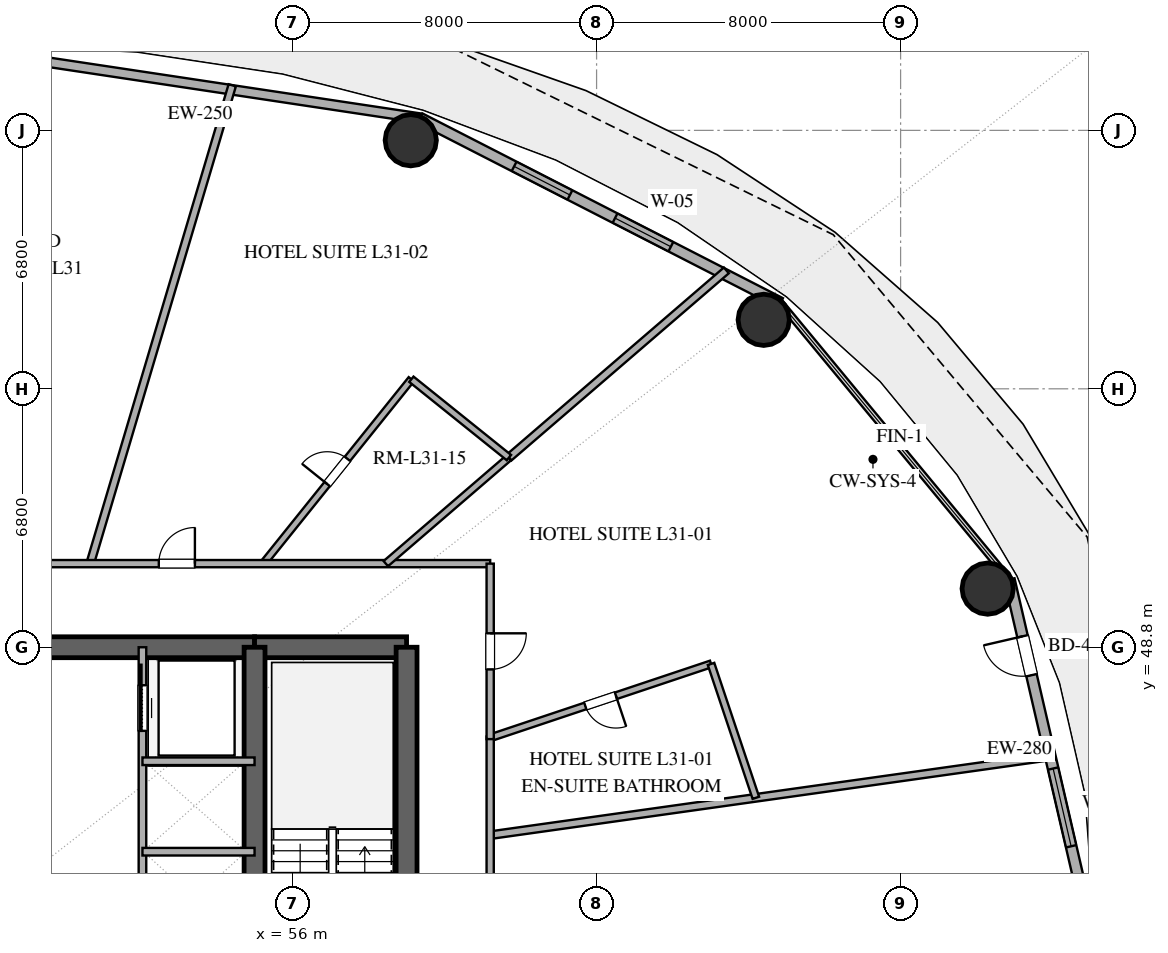
"""IFC4 building model, lengths in metres.
Left out: names, types, materials, properties, quantities, classifications, styles, units other than length and angle.
Written with IfcOpenShell. Run it as: python <this file> out.ifc"""

import sys

from ifc_helpers import new_model, si_unit, direction, frame, frame_2d, origin, origin_2d, place, context, subcontext, project, spatial, rectangle, hollow_circle, extrude, element, fill, save


model = new_model("IFC4")
c1 = context("Model", 3, precision=1e-05, world=origin(), true_north=direction((0.0, 1.0)))
c2 = subcontext(c1, "Body", "Model", "MODEL_VIEW")
j1 = project(units=[si_unit("LENGTHUNIT", "METRE"), si_unit("PLANEANGLEUNIT", "RADIAN")], contexts=[c1])
p1 = place(None, origin())
s1 = spatial("IfcSite", under=j1, at=p1, CompositionType="ELEMENT")
p2 = place(p1, origin())
s2 = spatial("IfcBuilding", under=s1, at=p2, CompositionType="ELEMENT")
p3 = place(p2, frame((0.0, 0.0, 123.6)))
s3 = spatial("IfcBuildingStorey", under=s2, at=p3, CompositionType="ELEMENT", Elevation=123.6)
p4 = place(p3, frame((41.0, 48.8, 0.0), z_axis=(0.0, 0.0, 1.0), x_axis=(1.0, 0.0, 0.0)))
e1 = element("IfcWall", 1, at=p4, inside=s3, PredefinedType="SHEAR", context=c2, shape_type="SweptSolid", body=[
    extrude(rectangle(XDim=14.0, YDim=0.55, at=frame_2d((7.0, 0.0))), origin(), (0.0, 0.0, 1.0), 3.38),
])
p5 = place(p4, frame((6.1, 0.0, 0.0)))
e2 = element("IfcOpeningElement", 2, at=p5, cuts=e1, PredefinedType="OPENING", context=c2, shape_type="SweptSolid", body=[
    extrude(rectangle(XDim=1.8, YDim=2.25, at=frame_2d((0.9, 1.125))), frame((0.0, 0.285, 0.0), z_axis=(0.0, -1.0, 0.0), x_axis=(1.0, 0.0, 0.0)), (0.0, 0.0, 1.0), 0.57),
])
p6 = place(p3, frame((55.0, 48.8, 0.0), z_axis=(0.0, 0.0, 1.0), x_axis=(1.0, 0.0, 0.0)))
e3 = element("IfcWall", 3, at=p6, inside=s3, PredefinedType="SHEAR", context=c2, shape_type="SweptSolid", body=[
    extrude(rectangle(XDim=4.0, YDim=0.55, at=frame_2d((2.0, 0.0))), origin(), (0.0, 0.0, 1.0), 3.38),
])
p7 = place(p3, frame((59.0, 35.2, 0.0), z_axis=(0.0, 0.0, 1.0), x_axis=(0.0, 1.0, 0.0)))
e4 = element("IfcWall", 4, at=p7, inside=s3, PredefinedType="SHEAR", context=c2, shape_type="SweptSolid", body=[
    extrude(rectangle(XDim=13.6, YDim=0.55, at=frame_2d((6.8, 0.0))), origin(), (0.0, 0.0, 1.0), 3.38),
])
p8 = place(p7, frame((1.5, 0.0, 0.0)))
e5 = element("IfcOpeningElement", 5, at=p8, cuts=e4, PredefinedType="OPENING", context=c2, shape_type="SweptSolid", body=[
    extrude(rectangle(XDim=1.2, YDim=2.15, at=frame_2d((0.6, 1.075))), frame((0.0, 0.285, 0.0), z_axis=(0.0, -1.0, 0.0), x_axis=(1.0, 0.0, 0.0)), (0.0, 0.0, 1.0), 0.57),
])
p9 = place(p3, frame((55.0, 35.2, 0.0), z_axis=(0.0, 0.0, 1.0), x_axis=(0.0, 1.0, 0.0)))
e6 = element("IfcWall", 6, at=p9, inside=s3, PredefinedType="SHEAR", context=c2, shape_type="SweptSolid", body=[
    extrude(rectangle(XDim=13.6, YDim=0.55, at=frame_2d((6.8, 0.0))), origin(), (0.0, 0.0, 1.0), 3.38),
])
p10 = place(p9, frame((1.15, 0.0, 0.0)))
e7 = element("IfcOpeningElement", 7, at=p10, cuts=e6, PredefinedType="OPENING", context=c2, shape_type="SweptSolid", body=[
    extrude(rectangle(XDim=1.1, YDim=2.2, at=frame_2d((0.55, 1.1))), frame((0.0, 0.285, 0.0), z_axis=(0.0, -1.0, 0.0), x_axis=(1.0, 0.0, 0.0)), (0.0, 0.0, 1.0), 0.57),
])
for number, where, z_axis, x_axis in (
    (8, (74.291, 50.343, 0.0), (0.0, 0.0, 1.0), (1.0, 0.0, 0.0)),
    (9, (68.398, 57.415, 0.0), (0.0, 0.0, 1.0), (1.0, 0.0, 0.0)),
    (10, (59.11, 62.141, 0.0), (0.0, 0.0, 1.0), (1.0, 0.0, 0.0)),
):
    element("IfcColumn", number, at=place(p3, frame(where, z_axis=z_axis, x_axis=x_axis)), inside=s3, PredefinedType="COLUMN", context=c2, shape_type="SweptSolid", body=[
        extrude(hollow_circle(Radius=0.675, WallThickness=0.036, at=origin_2d()), origin(), (0.0, 0.0, 1.0), 3.38),
    ])
p11 = place(p3, frame((76.849, 42.0, 0.0), z_axis=(0.0, 0.0, 1.0), x_axis=(-0.22558597182, 0.974223264616, 0.0)))
e11 = element("IfcWall", 11, at=p11, inside=s3, PredefinedType="SOLIDWALL", context=c2, shape_type="SweptSolid", body=[
    extrude(rectangle(XDim=8.811, YDim=0.28, at=frame_2d((4.405, 0.0))), origin(), (0.0, 0.0, 1.0), 3.38),
])
p12 = place(p11, frame((1.604, 0.0, 0.85)))
e12 = element("IfcOpeningElement", 12, at=p12, cuts=e11, PredefinedType="OPENING", context=c2, shape_type="SweptSolid", body=[
    extrude(rectangle(XDim=2.1, YDim=2.2, at=frame_2d((1.05, 1.1))), frame((0.0, 0.15, 0.0), z_axis=(0.0, -1.0, 0.0), x_axis=(1.0, 0.0, 0.0)), (0.0, 0.0, 1.0), 0.3),
])
p13 = place(p11, frame((6.225, 0.0, 0.0)))
e13 = element("IfcOpeningElement", 13, at=p13, cuts=e11, PredefinedType="OPENING", context=c2, shape_type="SweptSolid", body=[
    extrude(rectangle(XDim=1.05, YDim=2.2, at=frame_2d((0.525, 1.1))), frame((0.0, 0.15, 0.0), z_axis=(0.0, -1.0, 0.0), x_axis=(1.0, 0.0, 0.0)), (0.0, 0.0, 1.0), 0.3),
])
p14 = place(p3, frame((68.84, 57.86, 0.0), z_axis=(0.0, 0.0, 1.0), x_axis=(-0.889959505023, 0.45603955905, 0.0)))
e14 = element("IfcWall", 14, at=p14, inside=s3, PredefinedType="SOLIDWALL", context=c2, shape_type="SweptSolid", body=[
    extrude(rectangle(XDim=10.662, YDim=0.28, at=frame_2d((5.331, 0.0))), origin(), (0.0, 0.0, 1.0), 3.38),
])
p15 = place(p14, frame((3.242, 0.0, 0.85)))
e15 = element("IfcOpeningElement", 15, at=p15, cuts=e14, PredefinedType="OPENING", context=c2, shape_type="SweptSolid", body=[
    extrude(rectangle(XDim=1.65, YDim=2.0, at=frame_2d((0.825, 1.0))), frame((0.0, 0.15, 0.0), z_axis=(0.0, -1.0, 0.0), x_axis=(1.0, 0.0, 0.0)), (0.0, 0.0, 1.0), 0.3),
])
p16 = place(p14, frame((6.227, 0.0, 0.85)))
e16 = element("IfcOpeningElement", 16, at=p16, cuts=e14, PredefinedType="OPENING", context=c2, shape_type="SweptSolid", body=[
    extrude(rectangle(XDim=1.65, YDim=2.0, at=frame_2d((0.825, 1.0))), frame((0.0, 0.15, 0.0), z_axis=(0.0, -1.0, 0.0), x_axis=(1.0, 0.0, 0.0)), (0.0, 0.0, 1.0), 0.3),
])
p17 = place(p3, frame((59.351, 62.723, 0.0), z_axis=(0.0, 0.0, 1.0), x_axis=(-0.988877774656, 0.148730450117, 0.0)))
e17 = element("IfcWall", 17, at=p17, inside=s3, PredefinedType="SOLIDWALL", context=c2, shape_type="SweptSolid", body=[
    extrude(rectangle(XDim=11.479, YDim=0.25, at=frame_2d((5.74, 0.0))), origin(), (0.0, 0.0, 1.0), 3.38),
])
p18 = place(p3, frame((52.05, 38.4, 0.0), z_axis=(0.0, 0.0, 1.0), x_axis=(0.0, 1.0, 0.0)))
e18 = element("IfcWall", 18, at=p18, inside=s3, PredefinedType="SOLIDWALL", context=c2, shape_type="SweptSolid", body=[
    extrude(rectangle(XDim=10.4, YDim=0.2, at=frame_2d((5.2, 0.0))), origin(), (0.0, 0.0, 1.0), 2.74),
])
p19 = place(p18, frame((8.2, 0.0, 0.0)))
e19 = element("IfcOpeningElement", 19, at=p19, cuts=e18, PredefinedType="OPENING", context=c2, shape_type="SweptSolid", body=[
    extrude(rectangle(XDim=1.2, YDim=2.2, at=frame_2d((0.6, 1.1))), frame((0.0, 0.11, 0.0), z_axis=(0.0, -1.0, 0.0), x_axis=(1.0, 0.0, 0.0)), (0.0, 0.0, 1.0), 0.22),
])
for number, where, z_axis, x_axis in (
    (20, (52.05, 43.42, 0.0), (0.0, 0.0, 1.0), (1.0, 0.0, 0.0)),
    (21, (52.05, 45.8, 0.0), (0.0, 0.0, 1.0), (1.0, 0.0, 0.0)),
):
    element("IfcWall", number, at=place(p3, frame(where, z_axis=z_axis, x_axis=x_axis)), inside=s3, PredefinedType="SOLIDWALL", context=c2, shape_type="SweptSolid", body=[
        extrude(rectangle(XDim=2.95, YDim=0.2, at=frame_2d((1.475, 0.0))), origin(), (0.0, 0.0, 1.0), 2.74),
    ])
p20 = place(p3, frame((54.413, 63.586, 0.0), z_axis=(0.0, 0.0, 1.0), x_axis=(-0.284782789849, -0.958592073098, 0.0)))
e22 = element("IfcWall", 22, at=p20, inside=s3, PredefinedType="PARTITIONING", context=c2, shape_type="SweptSolid", body=[
    extrude(rectangle(XDim=13.129, YDim=0.2, at=frame_2d((6.565, 0.0))), origin(), (0.0, 0.0, 1.0), 2.74),
])
p21 = place(p3, frame((61.2, 43.855, 0.0), z_axis=(0.0, 0.0, 1.0), x_axis=(0.990266848234, 0.139181785048, 0.0)))
e23 = element("IfcWall", 23, at=p21, inside=s3, PredefinedType="PARTITIONING", context=c2, shape_type="SweptSolid", body=[
    extrude(rectangle(XDim=15.005, YDim=0.2, at=frame_2d((7.502, 0.0))), origin(), (0.0, 0.0, 1.0), 2.74),
])
p22 = place(p3, frame((67.415, 58.716, 0.0), z_axis=(0.0, 0.0, 1.0), x_axis=(-0.757805222449, -0.652480838668, 0.0)))
e24 = element("IfcWall", 24, at=p22, inside=s3, PredefinedType="PARTITIONING", context=c2, shape_type="SweptSolid", body=[
    extrude(rectangle(XDim=7.55, YDim=0.2, at=frame_2d((3.775, 0.0))), origin(), (0.0, 0.0, 1.0), 2.74),
])
p23 = place(p3, frame((55.229, 51.0, 0.0), z_axis=(0.0, 0.0, 1.0), x_axis=(0.626239129839, 0.779631035977, 0.0)))
e25 = element("IfcWall", 25, at=p23, inside=s3, PredefinedType="PLUMBINGWALL", context=c2, shape_type="SweptSolid", body=[
    extrude(rectangle(XDim=6.223, YDim=0.18, at=frame_2d((3.112, 0.0))), origin(), (0.0, 0.0, 1.0), 2.74),
])
p24 = place(p23, frame((2.687, 0.0, 0.0)))
e26 = element("IfcOpeningElement", 26, at=p24, cuts=e25, PredefinedType="OPENING", context=c2, shape_type="SweptSolid", body=[
    extrude(rectangle(XDim=0.85, YDim=2.1, at=frame_2d((0.425, 1.05))), frame((0.0, 0.1, 0.0), z_axis=(0.0, -1.0, 0.0), x_axis=(1.0, 0.0, 0.0)), (0.0, 0.0, 1.0), 0.2),
])
p25 = place(p3, frame((67.012, 48.361, 0.0), z_axis=(0.0, 0.0, 1.0), x_axis=(-0.948332174456, -0.317279193915, 0.0)))
e27 = element("IfcWall", 27, at=p25, inside=s3, PredefinedType="PLUMBINGWALL", context=c2, shape_type="SweptSolid", body=[
    extrude(rectangle(XDim=6.129, YDim=0.18, at=frame_2d((3.064, 0.0))), origin(), (0.0, 0.0, 1.0), 2.74),
])
p26 = place(p25, frame((2.639, 0.0, 0.0)))
e28 = element("IfcOpeningElement", 28, at=p26, cuts=e27, PredefinedType="OPENING", context=c2, shape_type="SweptSolid", body=[
    extrude(rectangle(XDim=0.85, YDim=2.1, at=frame_2d((0.425, 1.05))), frame((0.0, 0.1, 0.0), z_axis=(0.0, -1.0, 0.0), x_axis=(1.0, 0.0, 0.0)), (0.0, 0.0, 1.0), 0.2),
])
p27 = place(p3, frame((45.355, 51.0, 0.0), z_axis=(0.0, 0.0, 1.0), x_axis=(1.0, 0.0, 0.0)))
e29 = element("IfcWall", 29, at=p27, inside=s3, PredefinedType="PARTITIONING", context=c2, shape_type="SweptSolid", body=[
    extrude(rectangle(XDim=15.845, YDim=0.19, at=frame_2d((7.922, 0.0))), origin(), (0.0, 0.0, 1.0), 2.74),
])
p28 = place(p27, frame((2.176, 0.0, 0.0)))
e30 = element("IfcOpeningElement", 30, at=p28, cuts=e29, PredefinedType="OPENING", context=c2, shape_type="SweptSolid", body=[
    extrude(rectangle(XDim=1.0, YDim=2.2, at=frame_2d((0.5, 1.1))), frame((0.0, 0.105, 0.0), z_axis=(0.0, -1.0, 0.0), x_axis=(1.0, 0.0, 0.0)), (0.0, 0.0, 1.0), 0.21),
])
p29 = place(p27, frame((7.125, 0.0, 0.0)))
e31 = element("IfcOpeningElement", 31, at=p29, cuts=e29, PredefinedType="OPENING", context=c2, shape_type="SweptSolid", body=[
    extrude(rectangle(XDim=0.95, YDim=2.15, at=frame_2d((0.475, 1.075))), frame((0.0, 0.105, 0.0), z_axis=(0.0, -1.0, 0.0), x_axis=(1.0, 0.0, 0.0)), (0.0, 0.0, 1.0), 0.21),
])
p30 = place(p3, frame((61.2, 46.45, 0.0), z_axis=(0.0, 0.0, 1.0), x_axis=(0.0, -1.0, 0.0)))
e32 = element("IfcWall", 32, at=p30, inside=s3, PredefinedType="PARTITIONING", context=c2, shape_type="SweptSolid", body=[
    extrude(rectangle(XDim=10.564, YDim=0.19, at=frame_2d((5.282, 0.0))), origin(), (0.0, 0.0, 1.0), 2.74),
])
p31 = place(p30, frame((4.722, 0.0, 0.0)))
e33 = element("IfcOpeningElement", 33, at=p31, cuts=e32, PredefinedType="OPENING", context=c2, shape_type="SweptSolid", body=[
    extrude(rectangle(XDim=0.95, YDim=2.15, at=frame_2d((0.475, 1.075))), frame((0.0, 0.105, 0.0), z_axis=(0.0, -1.0, 0.0), x_axis=(1.0, 0.0, 0.0)), (0.0, 0.0, 1.0), 0.21),
])
p32 = place(p3, frame((61.2, 51.0, 0.0), z_axis=(0.0, 0.0, 1.0), x_axis=(0.0, -1.0, 0.0)))
e34 = element("IfcWall", 34, at=p32, inside=s3, PredefinedType="PARTITIONING", context=c2, shape_type="SweptSolid", body=[
    extrude(rectangle(XDim=4.617, YDim=0.19, at=frame_2d((2.309, 0.0))), origin(), (0.0, 0.0, 1.0), 2.74),
])
p33 = place(p32, frame((1.833, 0.0, 0.0)))
e35 = element("IfcOpeningElement", 35, at=p33, cuts=e34, PredefinedType="OPENING", context=c2, shape_type="SweptSolid", body=[
    extrude(rectangle(XDim=0.95, YDim=2.15, at=frame_2d((0.475, 1.075))), frame((0.0, 0.105, 0.0), z_axis=(0.0, -1.0, 0.0), x_axis=(1.0, 0.0, 0.0)), (0.0, 0.0, 1.0), 0.21),
])
p34 = place(p3, frame((61.694, 53.79, 0.0), z_axis=(0.0, 0.0, 1.0), x_axis=(-0.757844088621, -0.652435695945, 0.0)))
e36 = element("IfcWall", 36, at=p34, inside=s3, PredefinedType="PLUMBINGWALL", context=c2, shape_type="SweptSolid", body=[
    extrude(rectangle(XDim=4.276, YDim=0.18, at=frame_2d((2.138, 0.0))), origin(), (0.0, 0.0, 1.0), 2.74),
])
p35 = place(p3, frame((68.191, 44.838, 0.0), z_axis=(0.0, 0.0, 1.0), x_axis=(-0.317291996527, 0.948327891048, 0.0)))
e37 = element("IfcWall", 37, at=p35, inside=s3, PredefinedType="PLUMBINGWALL", context=c2, shape_type="SweptSolid", body=[
    extrude(rectangle(XDim=3.716, YDim=0.18, at=frame_2d((1.858, 0.0))), origin(), (0.0, 0.0, 1.0), 2.74),
])
p36 = place(p3, frame((59.126, 55.852, 0.0), z_axis=(0.0, 0.0, 1.0), x_axis=(0.779630447666, -0.626239862251, 0.0)))
e38 = element("IfcWall", 38, at=p36, inside=s3, PredefinedType="PLUMBINGWALL", context=c2, shape_type="SweptSolid", body=[
    extrude(rectangle(XDim=3.293, YDim=0.18, at=frame_2d((1.646, 0.0))), origin(), (0.0, 0.0, 1.0), 2.74),
])
p37 = place(p12, origin())
e39 = element("IfcWindow", 39, at=p37, inside=s3, PartitioningType="SINGLE_PANEL", PredefinedType="WINDOW", context=c2, shape_type="SweptSolid", body=[
    extrude(rectangle(XDim=2.1, YDim=2.2, at=frame_2d((1.05, 1.1))), frame((0.0, 0.03, 0.0), z_axis=(0.0, -1.0, 0.0), x_axis=(1.0, 0.0, 0.0)), (0.0, 0.0, 1.0), 0.06),
])
fill(e12, e39)
p38 = place(p13, origin())
e40 = element("IfcDoor", 40, at=p38, inside=s3, OperationType="SINGLE_SWING_RIGHT", PredefinedType="DOOR", context=c2, shape_type="SweptSolid", body=[
    extrude(rectangle(XDim=1.05, YDim=2.2, at=frame_2d((0.525, 1.1))), frame((0.0, 0.025, 0.0), z_axis=(0.0, -1.0, 0.0), x_axis=(1.0, 0.0, 0.0)), (0.0, 0.0, 1.0), 0.05),
])
fill(e13, e40)
p39 = place(p15, origin())
e41 = element("IfcWindow", 41, at=p39, inside=s3, PartitioningType="SINGLE_PANEL", PredefinedType="WINDOW", context=c2, shape_type="SweptSolid", body=[
    extrude(rectangle(XDim=1.65, YDim=2.0, at=frame_2d((0.825, 1.0))), frame((0.0, 0.03, 0.0), z_axis=(0.0, -1.0, 0.0), x_axis=(1.0, 0.0, 0.0)), (0.0, 0.0, 1.0), 0.06),
])
fill(e15, e41)
p40 = place(p16, origin())
e42 = element("IfcWindow", 42, at=p40, inside=s3, PartitioningType="SINGLE_PANEL", PredefinedType="WINDOW", context=c2, shape_type="SweptSolid", body=[
    extrude(rectangle(XDim=1.65, YDim=2.0, at=frame_2d((0.825, 1.0))), frame((0.0, 0.03, 0.0), z_axis=(0.0, -1.0, 0.0), x_axis=(1.0, 0.0, 0.0)), (0.0, 0.0, 1.0), 0.06),
])
fill(e16, e42)
p41 = place(p19, origin())
e43 = element("IfcDoor", 43, at=p41, inside=s3, OperationType="SLIDING_TO_RIGHT", PredefinedType="DOOR", context=c2, shape_type="SweptSolid", body=[
    extrude(rectangle(XDim=1.2, YDim=2.2, at=frame_2d((0.6, 1.1))), frame((0.0, 0.025, 0.0), z_axis=(0.0, -1.0, 0.0), x_axis=(1.0, 0.0, 0.0)), (0.0, 0.0, 1.0), 0.05),
])
fill(e19, e43)
p42 = place(p24, origin())
e44 = element("IfcDoor", 44, at=p42, inside=s3, OperationType="SINGLE_SWING_LEFT", PredefinedType="DOOR", context=c2, shape_type="SweptSolid", body=[
    extrude(rectangle(XDim=0.85, YDim=2.1, at=frame_2d((0.425, 1.05))), frame((0.0, 0.025, 0.0), z_axis=(0.0, -1.0, 0.0), x_axis=(1.0, 0.0, 0.0)), (0.0, 0.0, 1.0), 0.05),
])
fill(e26, e44)
p43 = place(p26, origin())
e45 = element("IfcDoor", 45, at=p43, inside=s3, OperationType="SINGLE_SWING_LEFT", PredefinedType="DOOR", context=c2, shape_type="SweptSolid", body=[
    extrude(rectangle(XDim=0.85, YDim=2.1, at=frame_2d((0.425, 1.05))), frame((0.0, 0.025, 0.0), z_axis=(0.0, -1.0, 0.0), x_axis=(1.0, 0.0, 0.0)), (0.0, 0.0, 1.0), 0.05),
])
fill(e28, e45)
p44 = place(p29, origin())
e46 = element("IfcDoor", 46, at=p44, inside=s3, OperationType="SINGLE_SWING_RIGHT", PredefinedType="DOOR", context=c2, shape_type="SweptSolid", body=[
    extrude(rectangle(XDim=0.95, YDim=2.15, at=frame_2d((0.475, 1.075))), frame((0.0, 0.025, 0.0), z_axis=(0.0, -1.0, 0.0), x_axis=(1.0, 0.0, 0.0)), (0.0, 0.0, 1.0), 0.05),
])
fill(e31, e46)
p45 = place(p33, origin())
e47 = element("IfcDoor", 47, at=p45, inside=s3, OperationType="SINGLE_SWING_LEFT", PredefinedType="DOOR", context=c2, shape_type="SweptSolid", body=[
    extrude(rectangle(XDim=0.95, YDim=2.15, at=frame_2d((0.475, 1.075))), frame((0.0, 0.025, 0.0), z_axis=(0.0, -1.0, 0.0), x_axis=(1.0, 0.0, 0.0)), (0.0, 0.0, 1.0), 0.05),
])
fill(e35, e47)
save(model, sys.argv[1])
